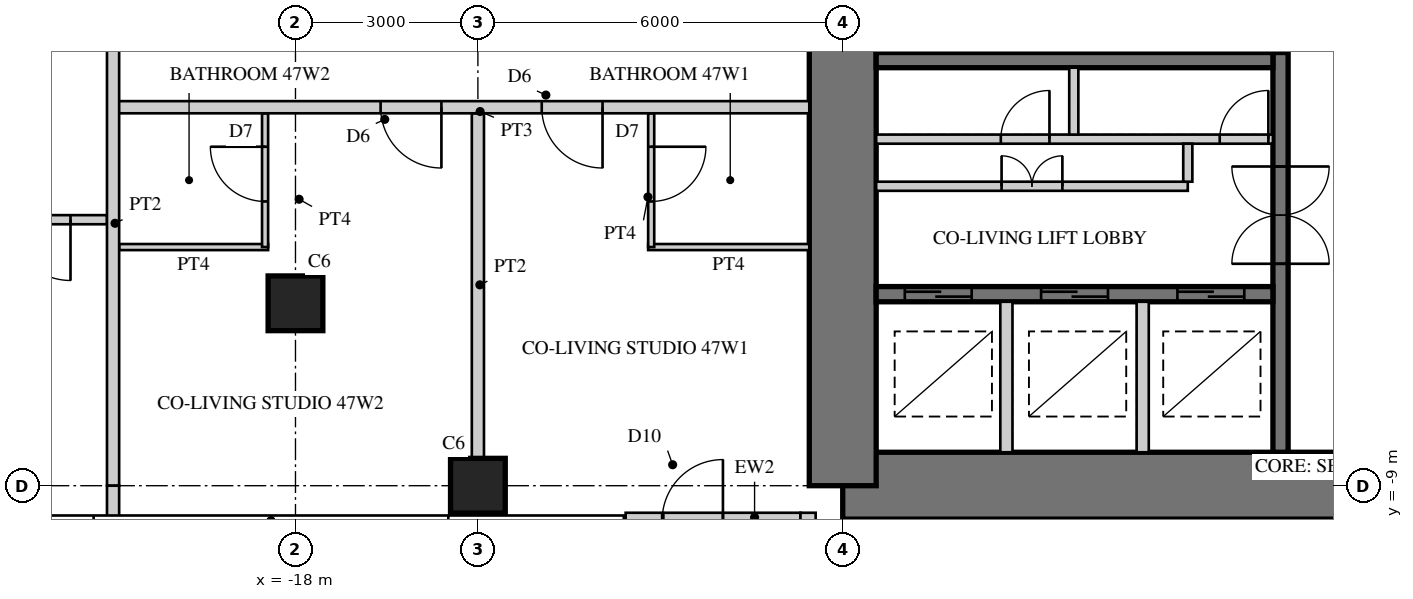
"""IFC4 building model, lengths in metres.
Left out: names, types, materials, properties, quantities, classifications, styles, units other than length and angle.
Written with IfcOpenShell. Run it as: python <this file> out.ifc"""

import sys

from ifc_helpers import new_model, si_unit, direction, frame, frame_2d, origin, origin_2d, place, context, subcontext, project, spatial, rectangle, hollow_rectangle, extrude, element, fill, save


model = new_model("IFC4")
c1 = context("Model", 3, precision=1e-05, world=origin(), true_north=direction((0.0, 1.0)))
c2 = subcontext(c1, "Body", "Model", "MODEL_VIEW")
j1 = project(units=[si_unit("LENGTHUNIT", "METRE"), si_unit("PLANEANGLEUNIT", "RADIAN")], contexts=[c1])
p1 = place(None, origin())
s1 = spatial("IfcSite", under=j1, at=p1, CompositionType="ELEMENT")
p2 = place(p1, origin())
s2 = spatial("IfcBuilding", under=s1, at=p2, CompositionType="ELEMENT")
p3 = place(p2, frame((0.0, 0.0, 189.9)))
s3 = spatial("IfcBuildingStorey", under=s2, at=p3, CompositionType="ELEMENT", Elevation=189.9)
p4 = place(p3, frame((-9.0, -9.0, 0.0), z_axis=(0.0, 0.0, 1.0), x_axis=(1.0, 0.0, 0.0)))
e1 = element("IfcWall", 1, at=p4, inside=s3, PredefinedType="SHEAR", context=c2, shape_type="SweptSolid", body=[
    extrude(rectangle(XDim=18.0, YDim=1.1, at=frame_2d((9.0, 0.0))), origin(), (0.0, 0.0, 1.0), 3.4),
])
p5 = place(p4, frame((9.8, 0.0, 0.0)))
e2 = element("IfcOpeningElement", 2, at=p5, cuts=e1, PredefinedType="OPENING", context=c2, shape_type="SweptSolid", body=[
    extrude(rectangle(XDim=1.0, YDim=2.4, at=frame_2d((0.5, 1.2))), frame((0.0, 0.56, 0.0), z_axis=(0.0, -1.0, 0.0), x_axis=(1.0, 0.0, 0.0)), (0.0, 0.0, 1.0), 1.12),
])
p6 = place(p3, frame((-9.0, 9.0, 0.0), z_axis=(0.0, 0.0, 1.0), x_axis=(0.0, -1.0, 0.0)))
e3 = element("IfcWall", 3, at=p6, inside=s3, PredefinedType="SHEAR", context=c2, shape_type="SweptSolid", body=[
    extrude(rectangle(XDim=18.0, YDim=1.1, at=frame_2d((9.0, 0.0))), origin(), (0.0, 0.0, 1.0), 3.4),
])
p7 = place(p6, frame((9.8, 0.0, 0.0)))
e4 = element("IfcOpeningElement", 4, at=p7, cuts=e3, PredefinedType="OPENING", context=c2, shape_type="SweptSolid", body=[
    extrude(rectangle(XDim=1.0, YDim=2.4, at=frame_2d((0.5, 1.2))), frame((0.0, 0.56, 0.0), z_axis=(0.0, -1.0, 0.0), x_axis=(1.0, 0.0, 0.0)), (0.0, 0.0, 1.0), 1.12),
])
p8 = place(p3, frame((-1.8, -1.875, 0.0), z_axis=(0.0, 0.0, 1.0), x_axis=(0.0, -1.0, 0.0)))
e5 = element("IfcWall", 5, at=p8, inside=s3, PredefinedType="SHEAR", context=c2, shape_type="SweptSolid", body=[
    extrude(rectangle(XDim=6.575, YDim=0.25, at=frame_2d((3.288, 0.0))), origin(), (0.0, 0.0, 1.0), 3.4),
])
p9 = place(p8, frame((1.875, 0.0, 0.0)))
e6 = element("IfcOpeningElement", 6, at=p9, cuts=e5, PredefinedType="OPENING", context=c2, shape_type="SweptSolid", body=[
    extrude(rectangle(XDim=1.6, YDim=2.4, at=frame_2d((0.8, 1.2))), frame((0.0, 0.135, 0.0), z_axis=(0.0, -1.0, 0.0), x_axis=(1.0, 0.0, 0.0)), (0.0, 0.0, 1.0), 0.27),
])
p10 = place(p3, frame((-1.925, -2.0, 0.0), z_axis=(0.0, 0.0, 1.0), x_axis=(-1.0, 0.0, 0.0)))
e7 = element("IfcWall", 7, at=p10, inside=s3, PredefinedType="SHEAR", context=c2, shape_type="SweptSolid", body=[
    extrude(rectangle(XDim=6.525, YDim=0.25, at=frame_2d((3.262, 0.0))), origin(), (0.0, 0.0, 1.0), 3.4),
])
p11 = place(p3, frame((-1.925, -5.85, 0.0), z_axis=(0.0, 0.0, 1.0), x_axis=(-1.0, 0.0, 0.0)))
e8 = element("IfcWall", 8, at=p11, inside=s3, PredefinedType="SHEAR", context=c2, shape_type="SweptSolid", body=[
    extrude(rectangle(XDim=6.525, YDim=0.25, at=frame_2d((3.262, 0.0))), origin(), (0.0, 0.0, 1.0), 3.4),
])
p12 = place(p11, frame((0.471, 0.0, 0.0)))
e9 = element("IfcOpeningElement", 9, at=p12, cuts=e8, PredefinedType="OPENING", context=c2, shape_type="SweptSolid", body=[
    extrude(rectangle(XDim=1.1, YDim=2.2, at=frame_2d((0.55, 1.1))), frame((0.0, 0.135, 0.0), z_axis=(0.0, -1.0, 0.0), x_axis=(1.0, 0.0, 0.0)), (0.0, 0.0, 1.0), 0.27),
])
p13 = place(p11, frame((2.712, 0.0, 0.0)))
e10 = element("IfcOpeningElement", 10, at=p13, cuts=e8, PredefinedType="OPENING", context=c2, shape_type="SweptSolid", body=[
    extrude(rectangle(XDim=1.1, YDim=2.2, at=frame_2d((0.55, 1.1))), frame((0.0, 0.135, 0.0), z_axis=(0.0, -1.0, 0.0), x_axis=(1.0, 0.0, 0.0)), (0.0, 0.0, 1.0), 0.27),
])
p14 = place(p11, frame((4.954, 0.0, 0.0)))
e11 = element("IfcOpeningElement", 11, at=p14, cuts=e8, PredefinedType="OPENING", context=c2, shape_type="SweptSolid", body=[
    extrude(rectangle(XDim=1.1, YDim=2.2, at=frame_2d((0.55, 1.1))), frame((0.0, 0.135, 0.0), z_axis=(0.0, -1.0, 0.0), x_axis=(1.0, 0.0, 0.0)), (0.0, 0.0, 1.0), 0.27),
])
p15 = place(p3, frame((-1.925, -3.3, 0.0), z_axis=(0.0, 0.0, 1.0), x_axis=(-1.0, 0.0, 0.0)))
e12 = element("IfcWall", 12, at=p15, inside=s3, PredefinedType="PARTITIONING", context=c2, shape_type="SweptSolid", body=[
    extrude(rectangle(XDim=6.525, YDim=0.15, at=frame_2d((3.262, 0.0))), origin(), (0.0, 0.0, 1.0), 3.4),
])
p16 = place(p15, frame((0.075, 0.0, 0.0)))
e13 = element("IfcOpeningElement", 13, at=p16, cuts=e12, PredefinedType="OPENING", context=c2, shape_type="SweptSolid", body=[
    extrude(rectangle(XDim=0.8, YDim=2.1, at=frame_2d((0.4, 1.05))), frame((0.0, 0.085, 0.0), z_axis=(0.0, -1.0, 0.0), x_axis=(1.0, 0.0, 0.0)), (0.0, 0.0, 1.0), 0.17),
])
p17 = place(p15, frame((3.675, 0.0, 0.0)))
e14 = element("IfcOpeningElement", 14, at=p17, cuts=e12, PredefinedType="OPENING", context=c2, shape_type="SweptSolid", body=[
    extrude(rectangle(XDim=0.8, YDim=2.1, at=frame_2d((0.4, 1.05))), frame((0.0, 0.085, 0.0), z_axis=(0.0, -1.0, 0.0), x_axis=(1.0, 0.0, 0.0)), (0.0, 0.0, 1.0), 0.17),
])
p18 = place(p3, frame((-5.2, -2.125, 0.0), z_axis=(0.0, 0.0, 1.0), x_axis=(0.0, -1.0, 0.0)))
e15 = element("IfcWall", 15, at=p18, inside=s3, PredefinedType="PARTITIONING", context=c2, shape_type="SweptSolid", body=[
    extrude(rectangle(XDim=1.1, YDim=0.15, at=frame_2d((0.55, 0.0))), origin(), (0.0, 0.0, 1.0), 3.4),
])
for number, where, z_axis, x_axis in (
    (16, (-4.067, -5.975, 0.0), (0.0, 0.0, 1.0), (0.0, -1.0, 0.0)),
    (17, (-6.308, -5.975, 0.0), (0.0, 0.0, 1.0), (0.0, -1.0, 0.0)),
):
    element("IfcWall", number, at=place(p3, frame(where, z_axis=z_axis, x_axis=x_axis)), inside=s3, PredefinedType="PARTITIONING", context=c2, shape_type="SweptSolid", body=[
        extrude(rectangle(XDim=2.475, YDim=0.2, at=frame_2d((1.237, 0.0))), origin(), (0.0, 0.0, 1.0), 3.4),
    ])
for number, where, z_axis, x_axis in (
    (18, (-15.0, -9.0, 0.0), (0.0, 0.0, 1.0), (1.0, 0.0, 0.0)),
    (19, (-18.0, -6.0, 0.0), (0.0, 0.0, 1.0), (1.0, 0.0, 0.0)),
):
    element("IfcColumn", number, at=place(p3, frame(where, z_axis=z_axis, x_axis=x_axis)), inside=s3, PredefinedType="COLUMN", context=c2, shape_type="SweptSolid", body=[
        extrude(rectangle(XDim=0.9, YDim=0.9, at=origin_2d()), origin(), (0.0, 0.0, 1.0), 3.4),
    ])
p19 = place(p3, frame((-12.57, -9.57, 0.0), z_axis=(0.0, 0.0, 1.0), x_axis=(1.0, 0.0, 0.0)))
e20 = element("IfcWall", 20, at=p19, inside=s3, PredefinedType="SOLIDWALL", context=c2, shape_type="SweptSolid", body=[
    extrude(rectangle(XDim=2.875, YDim=0.25, at=frame_2d((1.438, 0.0))), origin(), (0.0, 0.0, 1.0), 3.22),
])
p20 = place(p19, frame((0.6, 0.0, 0.0)))
e21 = element("IfcOpeningElement", 21, at=p20, cuts=e20, PredefinedType="OPENING", context=c2, shape_type="SweptSolid", body=[
    extrude(rectangle(XDim=1.0, YDim=2.2, at=frame_2d((0.5, 1.1))), frame((0.0, 0.135, 0.0), z_axis=(0.0, -1.0, 0.0), x_axis=(1.0, 0.0, 0.0)), (0.0, 0.0, 1.0), 0.27),
])
p21 = place(p3, frame((-9.57, -9.445, 0.0), z_axis=(0.0, 0.0, 1.0), x_axis=(0.0, -1.0, 0.0)))
e22 = element("IfcWall", 22, at=p21, inside=s3, PredefinedType="SOLIDWALL", context=c2, shape_type="SweptSolid", body=[
    extrude(rectangle(XDim=3.125, YDim=0.25, at=frame_2d((1.562, 0.0))), origin(), (0.0, 0.0, 1.0), 3.22),
])
p22 = place(p21, frame((0.6, 0.0, 0.0)))
e23 = element("IfcOpeningElement", 23, at=p22, cuts=e22, PredefinedType="OPENING", context=c2, shape_type="SweptSolid", body=[
    extrude(rectangle(XDim=1.0, YDim=2.2, at=frame_2d((0.5, 1.1))), frame((0.0, 0.135, 0.0), z_axis=(0.0, -1.0, 0.0), x_axis=(1.0, 0.0, 0.0)), (0.0, 0.0, 1.0), 0.27),
])
p23 = place(p3, frame((-3.325, -4.075, 0.0), z_axis=(0.0, 0.0, 1.0), x_axis=(-1.0, 0.0, 0.0)))
e24 = element("IfcWall", 24, at=p23, inside=s3, PredefinedType="PARTITIONING", context=c2, shape_type="SweptSolid", body=[
    extrude(rectangle(XDim=5.125, YDim=0.15, at=frame_2d((2.562, 0.0))), origin(), (0.0, 0.0, 1.0), 3.22),
])
p24 = place(p23, frame((2.062, 0.0, 0.0)))
e25 = element("IfcOpeningElement", 25, at=p24, cuts=e24, PredefinedType="OPENING", context=c2, shape_type="SweptSolid", body=[
    extrude(rectangle(XDim=1.0, YDim=2.1, at=frame_2d((0.5, 1.05))), frame((0.0, 0.085, 0.0), z_axis=(0.0, -1.0, 0.0), x_axis=(1.0, 0.0, 0.0)), (0.0, 0.0, 1.0), 0.17),
])
p25 = place(p3, frame((-3.325, -3.375, 0.0), z_axis=(0.0, 0.0, 1.0), x_axis=(0.0, -1.0, 0.0)))
e26 = element("IfcWall", 26, at=p25, inside=s3, PredefinedType="PARTITIONING", context=c2, shape_type="SweptSolid", body=[
    extrude(rectangle(XDim=0.625, YDim=0.15, at=frame_2d((0.312, 0.0))), origin(), (0.0, 0.0, 1.0), 3.22),
])
p26 = place(p3, frame((-9.55, -5.075, 0.0), z_axis=(0.0, 0.0, 1.0), x_axis=(-1.0, 0.0, 0.0)))
e27 = element("IfcWall", 27, at=p26, inside=s3, PredefinedType="PARTITIONING", context=c2, shape_type="SweptSolid", body=[
    extrude(rectangle(XDim=2.65, YDim=0.1, at=frame_2d((1.325, 0.0))), origin(), (0.0, 0.0, 1.0), 3.22),
])
p27 = place(p3, frame((-12.15, -2.875, 0.0), z_axis=(0.0, 0.0, 1.0), x_axis=(0.0, -1.0, 0.0)))
e28 = element("IfcWall", 28, at=p27, inside=s3, PredefinedType="PARTITIONING", context=c2, shape_type="SweptSolid", body=[
    extrude(rectangle(XDim=2.2, YDim=0.1, at=frame_2d((1.1, 0.0))), origin(), (0.0, 0.0, 1.0), 3.22),
])
p28 = place(p27, frame((0.55, 0.0, 0.0)))
e29 = element("IfcOpeningElement", 29, at=p28, cuts=e28, PredefinedType="OPENING", context=c2, shape_type="SweptSolid", body=[
    extrude(rectangle(XDim=0.9, YDim=2.1, at=frame_2d((0.45, 1.05))), frame((0.0, 0.06, 0.0), z_axis=(0.0, -1.0, 0.0), x_axis=(1.0, 0.0, 0.0)), (0.0, 0.0, 1.0), 0.12),
])
p29 = place(p3, frame((-15.0, -2.875, 0.0), z_axis=(0.0, 0.0, 1.0), x_axis=(0.0, -1.0, 0.0)))
e30 = element("IfcWall", 30, at=p29, inside=s3, PredefinedType="SOLIDWALL", context=c2, shape_type="SweptSolid", body=[
    extrude(rectangle(XDim=5.675, YDim=0.2, at=frame_2d((2.837, 0.0))), origin(), (0.0, 0.0, 1.0), 2.47),
])
p30 = place(p3, frame((-18.45, -5.075, 0.0), z_axis=(0.0, 0.0, 1.0), x_axis=(-1.0, 0.0, 0.0)))
e31 = element("IfcWall", 31, at=p30, inside=s3, PredefinedType="PARTITIONING", context=c2, shape_type="SweptSolid", body=[
    extrude(rectangle(XDim=2.45, YDim=0.1, at=frame_2d((1.225, 0.0))), origin(), (0.0, 0.0, 1.0), 3.22),
])
p31 = place(p3, frame((-18.5, -2.875, 0.0), z_axis=(0.0, 0.0, 1.0), x_axis=(0.0, -1.0, 0.0)))
e32 = element("IfcWall", 32, at=p31, inside=s3, PredefinedType="PARTITIONING", context=c2, shape_type="SweptSolid", body=[
    extrude(rectangle(XDim=2.2, YDim=0.1, at=frame_2d((1.1, 0.0))), origin(), (0.0, 0.0, 1.0), 3.22),
])
p32 = place(p31, frame((0.55, 0.0, 0.0)))
e33 = element("IfcOpeningElement", 33, at=p32, cuts=e32, PredefinedType="OPENING", context=c2, shape_type="SweptSolid", body=[
    extrude(rectangle(XDim=0.9, YDim=2.1, at=frame_2d((0.45, 1.05))), frame((0.0, 0.06, 0.0), z_axis=(0.0, -1.0, 0.0), x_axis=(1.0, 0.0, 0.0)), (0.0, 0.0, 1.0), 0.12),
])
p33 = place(p3, frame((-9.55, -2.775, 0.0), z_axis=(0.0, 0.0, 1.0), x_axis=(-1.0, 0.0, 0.0)))
e34 = element("IfcWall", 34, at=p33, inside=s3, PredefinedType="SOLIDWALL", context=c2, shape_type="SweptSolid", body=[
    extrude(rectangle(XDim=11.45, YDim=0.2, at=frame_2d((5.725, 0.0))), origin(), (0.0, 0.0, 1.0), 3.22),
])
p34 = place(p33, frame((3.4, 0.0, 0.0)))
e35 = element("IfcOpeningElement", 35, at=p34, cuts=e34, PredefinedType="OPENING", context=c2, shape_type="SweptSolid", body=[
    extrude(rectangle(XDim=1.0, YDim=2.15, at=frame_2d((0.5, 1.075))), frame((0.0, 0.11, 0.0), z_axis=(0.0, -1.0, 0.0), x_axis=(1.0, 0.0, 0.0)), (0.0, 0.0, 1.0), 0.22),
])
p35 = place(p33, frame((6.05, 0.0, 0.0)))
e36 = element("IfcOpeningElement", 36, at=p35, cuts=e34, PredefinedType="OPENING", context=c2, shape_type="SweptSolid", body=[
    extrude(rectangle(XDim=1.0, YDim=2.15, at=frame_2d((0.5, 1.075))), frame((0.0, 0.11, 0.0), z_axis=(0.0, -1.0, 0.0), x_axis=(1.0, 0.0, 0.0)), (0.0, 0.0, 1.0), 0.22),
])
p36 = place(p3, frame((-21.1, -4.625, 0.0), z_axis=(0.0, 0.0, 1.0), x_axis=(-1.0, 0.0, 0.0)))
e37 = element("IfcWall", 37, at=p36, inside=s3, PredefinedType="PARTITIONING", context=c2, shape_type="SweptSolid", body=[
    extrude(rectangle(XDim=5.5, YDim=0.15, at=frame_2d((2.75, 0.0))), origin(), (0.0, 0.0, 1.0), 3.22),
])
p37 = place(p36, frame((0.6, 0.0, 0.0)))
e38 = element("IfcOpeningElement", 38, at=p37, cuts=e37, PredefinedType="OPENING", context=c2, shape_type="SweptSolid", body=[
    extrude(rectangle(XDim=1.0, YDim=2.1, at=frame_2d((0.5, 1.05))), frame((0.0, 0.085, 0.0), z_axis=(0.0, -1.0, 0.0), x_axis=(1.0, 0.0, 0.0)), (0.0, 0.0, 1.0), 0.17),
])
p38 = place(p3, frame((-21.0, -0.4, 0.0), z_axis=(0.0, 0.0, 1.0), x_axis=(0.0, -1.0, 0.0)))
e39 = element("IfcWall", 39, at=p38, inside=s3, PredefinedType="SOLIDWALL", context=c2, shape_type="SweptSolid", body=[
    extrude(rectangle(XDim=8.6, YDim=0.2, at=frame_2d((4.3, 0.0))), origin(), (0.0, 0.0, 1.0), 2.62),
])
p39 = place(p38, frame((0.4, 0.0, 0.0)))
e40 = element("IfcOpeningElement", 40, at=p39, cuts=e39, PredefinedType="OPENING", context=c2, shape_type="SweptSolid", body=[
    extrude(rectangle(XDim=1.0, YDim=2.2, at=frame_2d((0.5, 1.1))), frame((0.0, 0.11, 0.0), z_axis=(0.0, -1.0, 0.0), x_axis=(1.0, 0.0, 0.0)), (0.0, 0.0, 1.0), 0.22),
])
p40 = place(p3, frame((-21.0, -9.0, 0.0), z_axis=(0.0, 0.0, 1.0), x_axis=(0.0, -1.0, 0.0)))
e41 = element("IfcWall", 41, at=p40, inside=s3, PredefinedType="SOLIDWALL", context=c2, shape_type="SweptSolid", body=[
    extrude(rectangle(XDim=0.53, YDim=0.2, at=frame_2d((0.265, 0.0))), origin(), (0.0, 0.0, 1.0), 3.22),
])
p41 = place(p20, origin())
e42 = element("IfcDoor", 42, at=p41, inside=s3, OperationType="SINGLE_SWING_RIGHT", PredefinedType="DOOR", context=c2, shape_type="SweptSolid", body=[
    extrude(hollow_rectangle(XDim=1.0, YDim=2.2, WallThickness=0.06, at=frame_2d((0.5, 1.1))), frame((0.0, 0.025, 0.0), z_axis=(0.0, -1.0, 0.0), x_axis=(1.0, 0.0, 0.0)), (0.0, 0.0, 1.0), 0.05),
    extrude(rectangle(XDim=0.879, YDim=2.079, at=frame_2d((0.5, 1.1))), frame((0.0, 0.025, 0.0), z_axis=(0.0, -1.0, 0.0), x_axis=(1.0, 0.0, 0.0)), (0.0, 0.0, 1.0), 0.05),
])
fill(e21, e42)
p42 = place(p24, frame((1.0, 0.0, 0.0), z_axis=(0.0, 0.0, 1.0), x_axis=(-1.0, 0.0, 0.0)))
e43 = element("IfcDoor", 43, at=p42, inside=s3, OperationType="DOUBLE_DOOR_SINGLE_SWING", PredefinedType="DOOR", context=c2, shape_type="SweptSolid", body=[
    extrude(rectangle(XDim=1.0, YDim=2.1, at=frame_2d((0.5, 1.05))), frame((0.0, 0.025, 0.0), z_axis=(0.0, -1.0, 0.0), x_axis=(1.0, 0.0, 0.0)), (0.0, 0.0, 1.0), 0.05),
])
fill(e25, e43)
p43 = place(p28, origin())
e44 = element("IfcDoor", 44, at=p43, inside=s3, OperationType="SINGLE_SWING_LEFT", PredefinedType="DOOR", context=c2, shape_type="SweptSolid", body=[
    extrude(rectangle(XDim=0.9, YDim=2.1, at=frame_2d((0.45, 1.05))), frame((0.0, 0.025, 0.0), z_axis=(0.0, -1.0, 0.0), x_axis=(1.0, 0.0, 0.0)), (0.0, 0.0, 1.0), 0.05),
])
fill(e29, e44)
p44 = place(p32, frame((0.9, 0.0, 0.0), z_axis=(0.0, 0.0, 1.0), x_axis=(-1.0, 0.0, 0.0)))
e45 = element("IfcDoor", 45, at=p44, inside=s3, OperationType="SINGLE_SWING_RIGHT", PredefinedType="DOOR", context=c2, shape_type="SweptSolid", body=[
    extrude(rectangle(XDim=0.9, YDim=2.1, at=frame_2d((0.45, 1.05))), frame((0.0, 0.025, 0.0), z_axis=(0.0, -1.0, 0.0), x_axis=(1.0, 0.0, 0.0)), (0.0, 0.0, 1.0), 0.05),
])
fill(e33, e45)
p45 = place(p34, origin())
e46 = element("IfcDoor", 46, at=p45, inside=s3, OperationType="SINGLE_SWING_LEFT", PredefinedType="DOOR", context=c2, shape_type="SweptSolid", body=[
    extrude(rectangle(XDim=1.0, YDim=2.15, at=frame_2d((0.5, 1.075))), frame((0.0, 0.025, 0.0), z_axis=(0.0, -1.0, 0.0), x_axis=(1.0, 0.0, 0.0)), (0.0, 0.0, 1.0), 0.05),
])
fill(e35, e46)
p46 = place(p35, origin())
e47 = element("IfcDoor", 47, at=p46, inside=s3, OperationType="SINGLE_SWING_LEFT", PredefinedType="DOOR", context=c2, shape_type="SweptSolid", body=[
    extrude(rectangle(XDim=1.0, YDim=2.15, at=frame_2d((0.5, 1.075))), frame((0.0, 0.025, 0.0), z_axis=(0.0, -1.0, 0.0), x_axis=(1.0, 0.0, 0.0)), (0.0, 0.0, 1.0), 0.05),
])
fill(e36, e47)
p47 = place(p37, origin())
e48 = element("IfcDoor", 48, at=p47, inside=s3, OperationType="SINGLE_SWING_LEFT", PredefinedType="DOOR", context=c2, shape_type="SweptSolid", body=[
    extrude(rectangle(XDim=1.0, YDim=2.1, at=frame_2d((0.5, 1.05))), frame((0.0, 0.025, 0.0), z_axis=(0.0, -1.0, 0.0), x_axis=(1.0, 0.0, 0.0)), (0.0, 0.0, 1.0), 0.05),
])
fill(e38, e48)
p48 = place(p12, origin())
e49 = element("IfcDoor", 49, at=p48, inside=s3, OperationType="DOUBLE_DOOR_SLIDING", PredefinedType="DOOR", context=c2, shape_type="SweptSolid", body=[
    extrude(rectangle(XDim=1.1, YDim=2.2, at=frame_2d((0.55, 1.1))), frame((0.0, 0.025, 0.0), z_axis=(0.0, -1.0, 0.0), x_axis=(1.0, 0.0, 0.0)), (0.0, 0.0, 1.0), 0.05),
])
fill(e9, e49)
p49 = place(p13, origin())
e50 = element("IfcDoor", 50, at=p49, inside=s3, OperationType="DOUBLE_DOOR_SLIDING", PredefinedType="DOOR", context=c2, shape_type="SweptSolid", body=[
    extrude(rectangle(XDim=1.1, YDim=2.2, at=frame_2d((0.55, 1.1))), frame((0.0, 0.025, 0.0), z_axis=(0.0, -1.0, 0.0), x_axis=(1.0, 0.0, 0.0)), (0.0, 0.0, 1.0), 0.05),
])
fill(e10, e50)
p50 = place(p14, origin())
e51 = element("IfcDoor", 51, at=p50, inside=s3, OperationType="DOUBLE_DOOR_SLIDING", PredefinedType="DOOR", context=c2, shape_type="SweptSolid", body=[
    extrude(rectangle(XDim=1.1, YDim=2.2, at=frame_2d((0.55, 1.1))), frame((0.0, 0.025, 0.0), z_axis=(0.0, -1.0, 0.0), x_axis=(1.0, 0.0, 0.0)), (0.0, 0.0, 1.0), 0.05),
])
fill(e11, e51)
p51 = place(p9, origin())
e52 = element("IfcDoor", 52, at=p51, inside=s3, OperationType="DOUBLE_DOOR_DOUBLE_SWING", PredefinedType="DOOR", context=c2, shape_type="SweptSolid", body=[
    extrude(rectangle(XDim=1.6, YDim=2.4, at=frame_2d((0.8, 1.2))), frame((0.0, 0.025, 0.0), z_axis=(0.0, -1.0, 0.0), x_axis=(1.0, 0.0, 0.0)), (0.0, 0.0, 1.0), 0.05),
])
fill(e6, e52)
p52 = place(p16, frame((0.8, 0.0, 0.0), z_axis=(0.0, 0.0, 1.0), x_axis=(-1.0, 0.0, 0.0)))
e53 = element("IfcDoor", 53, at=p52, inside=s3, OperationType="SINGLE_SWING_RIGHT", PredefinedType="DOOR", context=c2, shape_type="SweptSolid", body=[
    extrude(rectangle(XDim=0.8, YDim=2.1, at=frame_2d((0.4, 1.05))), frame((0.0, 0.025, 0.0), z_axis=(0.0, -1.0, 0.0), x_axis=(1.0, 0.0, 0.0)), (0.0, 0.0, 1.0), 0.05),
])
fill(e13, e53)
p53 = place(p17, frame((0.8, 0.0, 0.0), z_axis=(0.0, 0.0, 1.0), x_axis=(-1.0, 0.0, 0.0)))
e54 = element("IfcDoor", 54, at=p53, inside=s3, OperationType="SINGLE_SWING_RIGHT", PredefinedType="DOOR", context=c2, shape_type="SweptSolid", body=[
    extrude(rectangle(XDim=0.8, YDim=2.1, at=frame_2d((0.4, 1.05))), frame((0.0, 0.025, 0.0), z_axis=(0.0, -1.0, 0.0), x_axis=(1.0, 0.0, 0.0)), (0.0, 0.0, 1.0), 0.05),
])
fill(e14, e54)
save(model, sys.argv[1])
